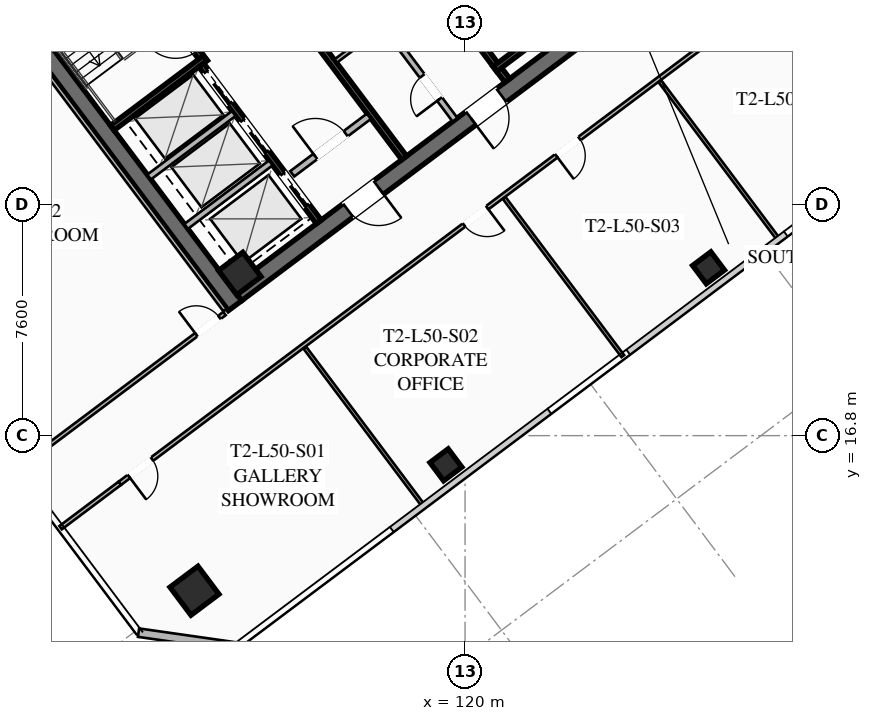
"""IFC4 building model, lengths in metres.
Left out: names, types, materials, properties, quantities, classifications, styles, units other than length and angle.
Written with IfcOpenShell. Run it as: python <this file> out.ifc"""

import sys

from ifc_helpers import new_model, si_unit, direction, frame, frame_2d, origin, origin_2d, place, context, subcontext, project, spatial, rectangle, hollow_rectangle, extrude, element, fill, save


model = new_model("IFC4")
c1 = context("Model", 3, precision=1e-05, world=origin(), true_north=direction((0.0, 1.0)))
c2 = subcontext(c1, "Body", "Model", "MODEL_VIEW")
j1 = project(units=[si_unit("LENGTHUNIT", "METRE"), si_unit("PLANEANGLEUNIT", "RADIAN")], contexts=[c1])
p1 = place(None, origin())
s1 = spatial("IfcSite", under=j1, at=p1, CompositionType="ELEMENT")
p2 = place(p1, origin())
s2 = spatial("IfcBuilding", under=s1, at=p2, CompositionType="ELEMENT")
p3 = place(p2, frame((0.0, 0.0, 185.4)))
s3 = spatial("IfcBuildingStorey", under=s2, at=p3, CompositionType="ELEMENT", Elevation=185.4)
p4 = place(p3, frame((112.436, 21.077, 0.0), z_axis=(0.0, 0.0, 1.0), x_axis=(-0.600005007985, 0.799996243986, 0.0)))
e1 = element("IfcWall", 1, at=p4, inside=s3, PredefinedType="SHEAR", context=c2, shape_type="SweptSolid", body=[
    extrude(rectangle(XDim=15.6, YDim=0.55, at=frame_2d((7.8, 0.0))), origin(), (0.0, 0.0, 1.0), 3.55),
])
p5 = place(p3, frame((124.539, 30.498, 0.0), z_axis=(0.0, 0.0, 1.0), x_axis=(-0.799998054672, -0.600002593761, 0.0)))
e2 = element("IfcWall", 2, at=p5, inside=s3, PredefinedType="SHEAR", context=c2, shape_type="SweptSolid", body=[
    extrude(rectangle(XDim=15.06, YDim=0.55, at=frame_2d((7.53, 0.0))), origin(), (0.0, 0.0, 1.0), 3.55),
])
p6 = place(p5, frame((9.23, 0.0, 0.0)))
e3 = element("IfcOpeningElement", 3, at=p6, cuts=e2, PredefinedType="OPENING", context=c2, shape_type="SweptSolid", body=[
    extrude(rectangle(XDim=1.25, YDim=2.25, at=frame_2d((0.625, 1.125))), frame((0.0, 0.285, 0.0), z_axis=(0.0, -1.0, 0.0), x_axis=(1.0, 0.0, 0.0)), (0.0, 0.0, 1.0), 0.57),
])
p7 = place(p5, frame((4.18, 0.0, 0.0)))
e4 = element("IfcOpeningElement", 4, at=p7, cuts=e2, PredefinedType="OPENING", context=c2, shape_type="SweptSolid", body=[
    extrude(rectangle(XDim=1.25, YDim=2.25, at=frame_2d((0.625, 1.125))), frame((0.0, 0.285, 0.0), z_axis=(0.0, -1.0, 0.0), x_axis=(1.0, 0.0, 0.0)), (0.0, 0.0, 1.0), 0.57),
])
p8 = place(p3, frame((112.59, 22.13, 0.0), z_axis=(0.0, 0.0, 1.0), x_axis=(0.799999996291, 0.600000004945, 0.0)))
e5 = element("IfcColumn", 5, at=p8, inside=s3, PredefinedType="COLUMN", context=c2, shape_type="SweptSolid", body=[
    extrude(hollow_rectangle(XDim=1.0, YDim=1.0, WallThickness=0.04, at=origin_2d()), origin(), (0.0, 0.0, 1.0), 3.37),
])
p9 = place(p3, frame((111.1, 11.7, 0.0), z_axis=(0.0, 0.0, 1.0), x_axis=(0.799999996291, 0.600000004945, 0.0)))
e6 = element("IfcColumn", 6, at=p9, inside=s3, PredefinedType="COLUMN", context=c2, shape_type="SweptSolid", body=[
    extrude(hollow_rectangle(XDim=1.15, YDim=1.15, WallThickness=0.045, at=origin_2d()), origin(), (0.0, 0.0, 1.0), 3.37),
])
for number, where, z_axis, x_axis in (
    (7, (119.37, 15.84, 0.0), (0.0, 0.0, 1.0), (0.8, 0.6, 0.0)),
    (8, (128.01, 22.32, 0.0), (0.0, 0.0, 1.0), (0.8, 0.6, 0.0)),
):
    element("IfcColumn", number, at=place(p3, frame(where, z_axis=z_axis, x_axis=x_axis)), inside=s3, PredefinedType="COLUMN", context=c2, shape_type="SweptSolid", body=[
        extrude(hollow_rectangle(XDim=0.75, YDim=0.75, WallThickness=0.032, at=origin_2d()), origin(), (0.0, 0.0, 1.0), 3.37),
    ])
p10 = place(p3, frame((112.48, 9.86, 0.0), z_axis=(0.0, 0.0, 1.0), x_axis=(-0.989950994782, 0.141410847992, 0.0)))
e9 = element("IfcWall", 9, at=p10, inside=s3, PredefinedType="SOLIDWALL", context=c2, shape_type="SweptSolid", body=[
    extrude(rectangle(XDim=3.253, YDim=0.28, at=frame_2d((1.626, 0.0))), origin(), (0.0, 0.0, 1.0), 3.37),
])
p11 = place(p3, frame((111.44, 29.08, 0.0), z_axis=(0.0, 0.0, 1.0), x_axis=(-0.59999029481, 0.8000072788, 0.0)))
e10 = element("IfcWall", 10, at=p11, inside=s3, PredefinedType="SHEAR", context=c2, shape_type="SweptSolid", body=[
    extrude(rectangle(XDim=8.05, YDim=0.2, at=frame_2d((4.025, 0.0))), origin(), (0.0, 0.0, 1.0), 3.37),
])
p12 = place(p11, frame((0.45, 0.0, 0.0)))
e11 = element("IfcOpeningElement", 11, at=p12, cuts=e10, PredefinedType="OPENING", context=c2, shape_type="SweptSolid", body=[
    extrude(rectangle(XDim=1.15, YDim=2.2, at=frame_2d((0.575, 1.1))), frame((0.0, 0.11, 0.0), z_axis=(0.0, -1.0, 0.0), x_axis=(1.0, 0.0, 0.0)), (0.0, 0.0, 1.0), 0.22),
])
p13 = place(p3, frame((108.396, 26.922, 0.0), z_axis=(0.0, 0.0, 1.0), x_axis=(0.800015298837, 0.599979601008, 0.0)))
e12 = element("IfcWall", 12, at=p13, inside=s3, PredefinedType="SHEAR", context=c2, shape_type="SweptSolid", body=[
    extrude(rectangle(XDim=3.83, YDim=0.2, at=frame_2d((1.915, 0.0))), origin(), (0.0, 0.0, 1.0), 3.37),
])
p14 = place(p3, frame((116.56, 34.92, 0.0), z_axis=(0.0, 0.0, 1.0), x_axis=(0.59999029481, -0.8000072788, 0.0)))
e13 = element("IfcWall", 13, at=p14, inside=s3, PredefinedType="SHEAR", context=c2, shape_type="SweptSolid", body=[
    extrude(rectangle(XDim=8.05, YDim=0.2, at=frame_2d((4.025, 0.0))), origin(), (0.0, 0.0, 1.0), 3.37),
])
p15 = place(p14, frame((0.45, 0.0, 0.0)))
e14 = element("IfcOpeningElement", 14, at=p15, cuts=e13, PredefinedType="OPENING", context=c2, shape_type="SweptSolid", body=[
    extrude(rectangle(XDim=1.15, YDim=2.2, at=frame_2d((0.575, 1.1))), frame((0.0, 0.11, 0.0), z_axis=(0.0, -1.0, 0.0), x_axis=(1.0, 0.0, 0.0)), (0.0, 0.0, 1.0), 0.22),
])
p16 = place(p3, frame((120.98, 28.86, 0.0), z_axis=(0.0, 0.0, 1.0), x_axis=(0.800015298837, 0.599979601008, 0.0)))
e15 = element("IfcWall", 15, at=p16, inside=s3, PredefinedType="SHEAR", context=c2, shape_type="SweptSolid", body=[
    extrude(rectangle(XDim=3.83, YDim=0.2, at=frame_2d((1.915, 0.0))), origin(), (0.0, 0.0, 1.0), 3.37),
])
p17 = place(p3, frame((117.998, 25.936, 0.0), z_axis=(0.0, 0.0, 1.0), x_axis=(-0.600002693989, 0.799997979501, 0.0)))
e16 = element("IfcWall", 16, at=p17, inside=s3, PredefinedType="SHEAR", context=c2, shape_type="SweptSolid", body=[
    extrude(rectangle(XDim=14.5, YDim=0.2, at=frame_2d((7.25, 0.0))), origin(), (0.0, 0.0, 1.0), 3.37),
])
p18 = place(p3, frame((114.316, 25.412, 0.0), z_axis=(0.0, 0.0, 1.0), x_axis=(0.800018601094, 0.59997519774, 0.0)))
e17 = element("IfcWall", 17, at=p18, inside=s3, PredefinedType="SOLIDWALL", context=c2, shape_type="SweptSolid", body=[
    extrude(rectangle(XDim=3.15, YDim=0.22, at=frame_2d((1.575, 0.0))), origin(), (0.0, 0.0, 1.0), 2.723),
])
p19 = place(p18, frame((0.95, 0.0, 0.0)))
e18 = element("IfcOpeningElement", 18, at=p19, cuts=e17, PredefinedType="OPENING", context=c2, shape_type="SweptSolid", body=[
    extrude(rectangle(XDim=1.25, YDim=2.25, at=frame_2d((0.625, 1.125))), frame((0.0, 0.12, 0.0), z_axis=(0.0, -1.0, 0.0), x_axis=(1.0, 0.0, 0.0)), (0.0, 0.0, 1.0), 0.24),
])
p20 = place(p3, frame((115.19, 23.83, 0.0), z_axis=(0.0, 0.0, 1.0), x_axis=(-0.599993943644, 0.800004542231, 0.0)))
e19 = element("IfcWall", 19, at=p20, inside=s3, PredefinedType="SHEAR", context=c2, shape_type="SweptSolid", body=[
    extrude(rectangle(XDim=6.45, YDim=0.2, at=frame_2d((3.225, 0.0))), origin(), (0.0, 0.0, 1.0), 3.37),
])
p21 = place(p20, frame((4.875, 0.0, 0.0)))
e20 = element("IfcOpeningElement", 20, at=p21, cuts=e19, PredefinedType="OPENING", context=c2, shape_type="SweptSolid", body=[
    extrude(rectangle(XDim=1.3, YDim=2.25, at=frame_2d((0.65, 1.125))), frame((0.0, 0.11, 0.0), z_axis=(0.0, -1.0, 0.0), x_axis=(1.0, 0.0, 0.0)), (0.0, 0.0, 1.0), 0.22),
])
p22 = place(p20, frame((2.875, 0.0, 0.0)))
e21 = element("IfcOpeningElement", 21, at=p22, cuts=e19, PredefinedType="OPENING", context=c2, shape_type="SweptSolid", body=[
    extrude(rectangle(XDim=1.3, YDim=2.25, at=frame_2d((0.65, 1.125))), frame((0.0, 0.11, 0.0), z_axis=(0.0, -1.0, 0.0), x_axis=(1.0, 0.0, 0.0)), (0.0, 0.0, 1.0), 0.22),
])
p23 = place(p20, frame((0.675, 0.0, 0.0)))
e22 = element("IfcOpeningElement", 22, at=p23, cuts=e19, PredefinedType="OPENING", context=c2, shape_type="SweptSolid", body=[
    extrude(rectangle(XDim=1.3, YDim=2.25, at=frame_2d((0.65, 1.125))), frame((0.0, 0.11, 0.0), z_axis=(0.0, -1.0, 0.0), x_axis=(1.0, 0.0, 0.0)), (0.0, 0.0, 1.0), 0.22),
])
for number, where, z_axis, x_axis in (
    (23, (110.826, 23.682, 0.0), (0.0, 0.0, 1.0), (0.8, 0.6, 0.0)),
    (24, (109.608, 25.306, 0.0), (0.0, 0.0, 1.0), (0.8, 0.6, 0.0)),
):
    element("IfcWall", number, at=place(p3, frame(where, z_axis=z_axis, x_axis=x_axis)), inside=s3, PredefinedType="SOLIDWALL", context=c2, shape_type="SweptSolid", body=[
        extrude(rectangle(XDim=3.48, YDim=0.2, at=frame_2d((1.74, 0.0))), origin(), (0.0, 0.0, 1.0), 3.37),
    ])
p24 = place(p3, frame((119.67, 27.19, 0.0), z_axis=(0.0, 0.0, 1.0), x_axis=(-0.599988677396, 0.800008491828, 0.0)))
e25 = element("IfcWall", 25, at=p24, inside=s3, PredefinedType="SOLIDWALL", context=c2, shape_type="SweptSolid", body=[
    extrude(rectangle(XDim=6.9, YDim=0.2, at=frame_2d((3.45, 0.0))), origin(), (0.0, 0.0, 1.0), 2.723),
])
p25 = place(p24, frame((0.85, 0.0, 0.0)))
e26 = element("IfcOpeningElement", 26, at=p25, cuts=e25, PredefinedType="OPENING", context=c2, shape_type="SweptSolid", body=[
    extrude(rectangle(XDim=0.95, YDim=2.05, at=frame_2d((0.475, 1.025))), frame((0.0, 0.11, 0.0), z_axis=(0.0, -1.0, 0.0), x_axis=(1.0, 0.0, 0.0)), (0.0, 0.0, 1.0), 0.22),
])
p26 = place(p24, frame((4.8, 0.0, 0.0)))
e27 = element("IfcOpeningElement", 27, at=p26, cuts=e25, PredefinedType="OPENING", context=c2, shape_type="SweptSolid", body=[
    extrude(rectangle(XDim=1.05, YDim=2.2, at=frame_2d((0.525, 1.1))), frame((0.0, 0.11, 0.0), z_axis=(0.0, -1.0, 0.0), x_axis=(1.0, 0.0, 0.0)), (0.0, 0.0, 1.0), 0.22),
])
p27 = place(p3, frame((115.746, 29.122, 0.0), z_axis=(0.0, 0.0, 1.0), x_axis=(0.8, 0.6, 0.0)))
e28 = element("IfcWall", 28, at=p27, inside=s3, PredefinedType="PARTITIONING", context=c2, shape_type="SweptSolid", body=[
    extrude(rectangle(XDim=1.88, YDim=0.135, at=frame_2d((0.94, 0.0))), origin(), (0.0, 0.0, 1.0), 2.723),
])
p28 = place(p3, frame((131.6, 32.45, 0.0), z_axis=(0.0, 0.0, 1.0), x_axis=(-0.800003062365, -0.599995916825, 0.0)))
e29 = element("IfcWall", 29, at=p28, inside=s3, PredefinedType="PARTITIONING", context=c2, shape_type="SweptSolid", body=[
    extrude(rectangle(XDim=28.7, YDim=0.135, at=frame_2d((14.35, 0.0))), origin(), (0.0, 0.0, 1.0), 2.723),
])
p29 = place(p28, frame((27.37, 0.0, 0.0)))
e30 = element("IfcOpeningElement", 30, at=p29, cuts=e29, PredefinedType="OPENING", context=c2, shape_type="SweptSolid", body=[
    extrude(rectangle(XDim=0.95, YDim=2.05, at=frame_2d((0.475, 1.025))), frame((0.0, 0.077, 0.0), z_axis=(0.0, -1.0, 0.0), x_axis=(1.0, 0.0, 0.0)), (0.0, 0.0, 1.0), 0.155),
])
p30 = place(p28, frame((13.59, 0.0, 0.0)))
e31 = element("IfcOpeningElement", 31, at=p30, cuts=e29, PredefinedType="OPENING", context=c2, shape_type="SweptSolid", body=[
    extrude(rectangle(XDim=0.95, YDim=2.05, at=frame_2d((0.475, 1.025))), frame((0.0, 0.077, 0.0), z_axis=(0.0, -1.0, 0.0), x_axis=(1.0, 0.0, 0.0)), (0.0, 0.0, 1.0), 0.155),
])
p31 = place(p28, frame((9.796, 0.0, 0.0)))
e32 = element("IfcOpeningElement", 32, at=p31, cuts=e29, PredefinedType="OPENING", context=c2, shape_type="SweptSolid", body=[
    extrude(rectangle(XDim=0.95, YDim=2.05, at=frame_2d((0.475, 1.025))), frame((0.0, 0.077, 0.0), z_axis=(0.0, -1.0, 0.0), x_axis=(1.0, 0.0, 0.0)), (0.0, 0.0, 1.0), 0.155),
])
p32 = place(p28, frame((0.38, 0.0, 0.0)))
e33 = element("IfcOpeningElement", 33, at=p32, cuts=e29, PredefinedType="OPENING", context=c2, shape_type="SweptSolid", body=[
    extrude(rectangle(XDim=0.95, YDim=2.05, at=frame_2d((0.475, 1.025))), frame((0.0, 0.077, 0.0), z_axis=(0.0, -1.0, 0.0), x_axis=(1.0, 0.0, 0.0)), (0.0, 0.0, 1.0), 0.155),
])
p33 = place(p3, frame((106.696, 13.772, 0.0), z_axis=(0.0, 0.0, 1.0), x_axis=(0.799975885537, 0.600032151272, 0.0)))
e34 = element("IfcWall", 34, at=p33, inside=s3, PredefinedType="PARTITIONING", context=c2, shape_type="SweptSolid", body=[
    extrude(rectangle(XDim=2.43, YDim=0.135, at=frame_2d((1.215, 0.0))), origin(), (0.0, 0.0, 1.0), 2.723),
])
for number, where, z_axis, x_axis in (
    (35, (118.628, 14.496, 0.0), (0.0, 0.0, 1.0), (-0.6, 0.8, 0.0)),
    (36, (125.188, 19.416, 0.0), (0.0, 0.0, 1.0), (-0.6, 0.8, 0.0)),
    (37, (130.308, 23.256, 0.0), (0.0, 0.0, 1.0), (-0.6, 0.8, 0.0)),
):
    element("IfcWall", number, at=place(p3, frame(where, z_axis=z_axis, x_axis=x_axis)), inside=s3, PredefinedType="PARTITIONING", context=c2, shape_type="SweptSolid", body=[
        extrude(rectangle(XDim=6.5, YDim=0.11, at=frame_2d((3.25, 0.0))), origin(), (0.0, 0.0, 1.0), 2.723),
    ])
p34 = place(p3, frame((112.104, 20.928, 0.0), z_axis=(0.0, 0.0, 1.0), x_axis=(-0.599994940075, 0.800003794918, 0.0)))
e38 = element("IfcWall", 38, at=p34, inside=s3, PredefinedType="PARTITIONING", context=c2, shape_type="SweptSolid", body=[
    extrude(rectangle(XDim=15.44, YDim=0.135, at=frame_2d((7.72, 0.0))), origin(), (0.0, 0.0, 1.0), 2.723),
])
p35 = place(p3, frame((105.256, 15.692, 0.0), z_axis=(0.0, 0.0, 1.0), x_axis=(0.799989708052, 0.600013722352, 0.0)))
e39 = element("IfcWall", 39, at=p35, inside=s3, PredefinedType="PARTITIONING", context=c2, shape_type="SweptSolid", body=[
    extrude(rectangle(XDim=8.54, YDim=0.135, at=frame_2d((4.27, 0.0))), origin(), (0.0, 0.0, 1.0), 2.723),
])
p36 = place(p35, frame((7.38, 0.0, 0.0)))
e40 = element("IfcOpeningElement", 40, at=p36, cuts=e39, PredefinedType="OPENING", context=c2, shape_type="SweptSolid", body=[
    extrude(rectangle(XDim=0.95, YDim=2.05, at=frame_2d((0.475, 1.025))), frame((0.0, 0.077, 0.0), z_axis=(0.0, -1.0, 0.0), x_axis=(1.0, 0.0, 0.0)), (0.0, 0.0, 1.0), 0.155),
])
p37 = place(p6, origin())
e41 = element("IfcDoor", 41, at=p37, inside=s3, OperationType="SINGLE_SWING_LEFT", PredefinedType="DOOR", context=c2, shape_type="SweptSolid", body=[
    extrude(rectangle(XDim=1.25, YDim=2.25, at=frame_2d((0.625, 1.125))), frame((0.0, 0.025, 0.0), z_axis=(0.0, -1.0, 0.0), x_axis=(1.0, 0.0, 0.0)), (0.0, 0.0, 1.0), 0.05),
])
fill(e3, e41)
p38 = place(p7, origin())
e42 = element("IfcDoor", 42, at=p38, inside=s3, OperationType="SINGLE_SWING_RIGHT", PredefinedType="DOOR", context=c2, shape_type="SweptSolid", body=[
    extrude(rectangle(XDim=1.25, YDim=2.25, at=frame_2d((0.625, 1.125))), frame((0.0, 0.025, 0.0), z_axis=(0.0, -1.0, 0.0), x_axis=(1.0, 0.0, 0.0)), (0.0, 0.0, 1.0), 0.05),
])
fill(e4, e42)
p39 = place(p19, origin())
e43 = element("IfcDoor", 43, at=p39, inside=s3, OperationType="SINGLE_SWING_LEFT", PredefinedType="DOOR", context=c2, shape_type="SweptSolid", body=[
    extrude(rectangle(XDim=1.25, YDim=2.25, at=frame_2d((0.625, 1.125))), frame((0.0, 0.025, 0.0), z_axis=(0.0, -1.0, 0.0), x_axis=(1.0, 0.0, 0.0)), (0.0, 0.0, 1.0), 0.05),
])
fill(e18, e43)
p40 = place(p25, origin())
e44 = element("IfcDoor", 44, at=p40, inside=s3, OperationType="SINGLE_SWING_LEFT", PredefinedType="DOOR", context=c2, shape_type="SweptSolid", body=[
    extrude(rectangle(XDim=0.95, YDim=2.05, at=frame_2d((0.475, 1.025))), frame((0.0, 0.025, 0.0), z_axis=(0.0, -1.0, 0.0), x_axis=(1.0, 0.0, 0.0)), (0.0, 0.0, 1.0), 0.05),
])
fill(e26, e44)
p41 = place(p29, origin())
e45 = element("IfcDoor", 45, at=p41, inside=s3, OperationType="SINGLE_SWING_RIGHT", PredefinedType="DOOR", context=c2, shape_type="SweptSolid", body=[
    extrude(rectangle(XDim=0.95, YDim=2.05, at=frame_2d((0.475, 1.025))), frame((0.0, 0.025, 0.0), z_axis=(0.0, -1.0, 0.0), x_axis=(1.0, 0.0, 0.0)), (0.0, 0.0, 1.0), 0.05),
])
fill(e30, e45)
p42 = place(p30, origin())
e46 = element("IfcDoor", 46, at=p42, inside=s3, OperationType="SINGLE_SWING_LEFT", PredefinedType="DOOR", context=c2, shape_type="SweptSolid", body=[
    extrude(rectangle(XDim=0.95, YDim=2.05, at=frame_2d((0.475, 1.025))), frame((0.0, 0.025, 0.0), z_axis=(0.0, -1.0, 0.0), x_axis=(1.0, 0.0, 0.0)), (0.0, 0.0, 1.0), 0.05),
])
fill(e31, e46)
p43 = place(p31, origin())
e47 = element("IfcDoor", 47, at=p43, inside=s3, OperationType="SINGLE_SWING_RIGHT", PredefinedType="DOOR", context=c2, shape_type="SweptSolid", body=[
    extrude(rectangle(XDim=0.95, YDim=2.05, at=frame_2d((0.475, 1.025))), frame((0.0, 0.025, 0.0), z_axis=(0.0, -1.0, 0.0), x_axis=(1.0, 0.0, 0.0)), (0.0, 0.0, 1.0), 0.05),
])
fill(e32, e47)
p44 = place(p36, origin())
e48 = element("IfcDoor", 48, at=p44, inside=s3, OperationType="SINGLE_SWING_LEFT", PredefinedType="DOOR", context=c2, shape_type="SweptSolid", body=[
    extrude(rectangle(XDim=0.95, YDim=2.05, at=frame_2d((0.475, 1.025))), frame((0.0, 0.025, 0.0), z_axis=(0.0, -1.0, 0.0), x_axis=(1.0, 0.0, 0.0)), (0.0, 0.0, 1.0), 0.05),
])
fill(e40, e48)
p45 = place(p21, origin())
e49 = element("IfcDoor", 49, at=p45, inside=s3, OperationType="SLIDING_TO_LEFT", PredefinedType="DOOR", context=c2, shape_type="SweptSolid", body=[
    extrude(rectangle(XDim=1.3, YDim=2.25, at=frame_2d((0.65, 1.125))), frame((0.0, 0.025, 0.0), z_axis=(0.0, -1.0, 0.0), x_axis=(1.0, 0.0, 0.0)), (0.0, 0.0, 1.0), 0.05),
])
fill(e20, e49)
p46 = place(p22, origin())
e50 = element("IfcDoor", 50, at=p46, inside=s3, OperationType="SLIDING_TO_LEFT", PredefinedType="DOOR", context=c2, shape_type="SweptSolid", body=[
    extrude(rectangle(XDim=1.3, YDim=2.25, at=frame_2d((0.65, 1.125))), frame((0.0, 0.025, 0.0), z_axis=(0.0, -1.0, 0.0), x_axis=(1.0, 0.0, 0.0)), (0.0, 0.0, 1.0), 0.05),
])
fill(e21, e50)
p47 = place(p23, origin())
e51 = element("IfcDoor", 51, at=p47, inside=s3, OperationType="SLIDING_TO_LEFT", PredefinedType="DOOR", context=c2, shape_type="SweptSolid", body=[
    extrude(rectangle(XDim=1.3, YDim=2.25, at=frame_2d((0.65, 1.125))), frame((0.0, 0.025, 0.0), z_axis=(0.0, -1.0, 0.0), x_axis=(1.0, 0.0, 0.0)), (0.0, 0.0, 1.0), 0.05),
])
fill(e22, e51)
save(model, sys.argv[1])
